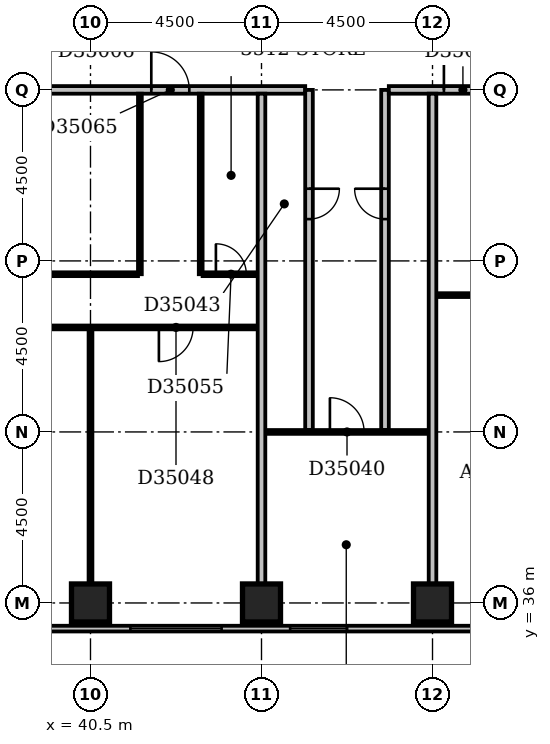
"""IFC4 building model, lengths in metres.
Left out: names, types, materials, properties, quantities, classifications, styles, units other than length and angle.
Written with IfcOpenShell. Run it as: python <this file> out.ifc"""

import sys

from ifc_helpers import new_model, si_unit, direction, frame, frame_2d, origin, origin_2d, place, context, subcontext, project, spatial, rectangle, extrude, element, fill, save


model = new_model("IFC4")
c1 = context("Model", 3, precision=1e-05, world=origin(), true_north=direction((0.0, 1.0)))
c2 = subcontext(c1, "Body", "Model", "MODEL_VIEW")
j1 = project(units=[si_unit("LENGTHUNIT", "METRE"), si_unit("PLANEANGLEUNIT", "RADIAN")], contexts=[c1])
p1 = place(None, origin())
s1 = spatial("IfcSite", under=j1, at=p1, CompositionType="ELEMENT")
p2 = place(p1, origin())
s2 = spatial("IfcBuilding", under=s1, at=p2, CompositionType="ELEMENT")
p3 = place(p2, frame((0.0, 0.0, 141.2)))
s3 = spatial("IfcBuildingStorey", under=s2, at=p3, CompositionType="ELEMENT", Elevation=141.2)
for number, where, z_axis, x_axis in (
    (1, (40.5, 36.0, -0.3), (0.0, 0.0, 1.0), (1.0, 0.0, 0.0)),
    (2, (45.0, 36.0, -0.3), (0.0, 0.0, 1.0), (1.0, 0.0, 0.0)),
    (3, (49.5, 36.0, -0.3), (0.0, 0.0, 1.0), (1.0, 0.0, 0.0)),
):
    element("IfcColumn", number, at=place(p3, frame(where, z_axis=z_axis, x_axis=x_axis)), inside=s3, PredefinedType="COLUMN", context=c2, shape_type="SweptSolid", body=[
        extrude(rectangle(XDim=1.0, YDim=1.0, at=origin_2d()), origin(), (0.0, 0.0, 1.0), 3.6),
    ])
p4 = place(p3, frame((23.1, 35.325, 0.0), z_axis=(0.0, 0.0, 1.0), x_axis=(1.0, 0.0, 0.0)))
e4 = element("IfcWall", 4, at=p4, inside=s3, PredefinedType="STANDARD", context=c2, shape_type="SweptSolid", body=[
    extrude(rectangle(XDim=45.15, YDim=0.15, at=frame_2d((22.575, 0.0))), origin(), (0.0, 0.0, 1.0), 2.7),
])
p5 = place(p4, frame((0.24, 0.0, 0.6)))
e5 = element("IfcOpeningElement", 5, at=p5, cuts=e4, PredefinedType="OPENING", context=c2, shape_type="SweptSolid", body=[
    extrude(rectangle(XDim=0.45, YDim=1.8, at=frame_2d((0.225, 0.9))), frame((0.0, 0.087, 0.0), z_axis=(0.0, -1.0, 0.0), x_axis=(1.0, 0.0, 0.0)), (0.0, 0.0, 1.0), 0.174),
])
p6 = place(p4, frame((2.529, 0.0, 0.6)))
e6 = element("IfcOpeningElement", 6, at=p6, cuts=e4, PredefinedType="OPENING", context=c2, shape_type="SweptSolid", body=[
    extrude(rectangle(XDim=0.6, YDim=1.8, at=frame_2d((0.3, 0.9))), frame((0.0, 0.087, 0.0), z_axis=(0.0, -1.0, 0.0), x_axis=(1.0, 0.0, 0.0)), (0.0, 0.0, 1.0), 0.174),
])
p7 = place(p4, frame((4.95, 0.0, 0.6)))
e7 = element("IfcOpeningElement", 7, at=p7, cuts=e4, PredefinedType="OPENING", context=c2, shape_type="SweptSolid", body=[
    extrude(rectangle(XDim=2.4, YDim=1.8, at=frame_2d((1.2, 0.9))), frame((0.0, 0.087, 0.0), z_axis=(0.0, -1.0, 0.0), x_axis=(1.0, 0.0, 0.0)), (0.0, 0.0, 1.0), 0.174),
])
p8 = place(p4, frame((9.45, 0.0, 0.6)))
e8 = element("IfcOpeningElement", 8, at=p8, cuts=e4, PredefinedType="OPENING", context=c2, shape_type="SweptSolid", body=[
    extrude(rectangle(XDim=2.4, YDim=1.8, at=frame_2d((1.2, 0.9))), frame((0.0, 0.087, 0.0), z_axis=(0.0, -1.0, 0.0), x_axis=(1.0, 0.0, 0.0)), (0.0, 0.0, 1.0), 0.174),
])
p9 = place(p4, frame((13.95, 0.0, 0.6)))
e9 = element("IfcOpeningElement", 9, at=p9, cuts=e4, PredefinedType="OPENING", context=c2, shape_type="SweptSolid", body=[
    extrude(rectangle(XDim=2.4, YDim=1.8, at=frame_2d((1.2, 0.9))), frame((0.0, 0.087, 0.0), z_axis=(0.0, -1.0, 0.0), x_axis=(1.0, 0.0, 0.0)), (0.0, 0.0, 1.0), 0.174),
])
p10 = place(p4, frame((18.45, 0.0, 0.6)))
e10 = element("IfcOpeningElement", 10, at=p10, cuts=e4, PredefinedType="OPENING", context=c2, shape_type="SweptSolid", body=[
    extrude(rectangle(XDim=2.4, YDim=1.8, at=frame_2d((1.2, 0.9))), frame((0.0, 0.087, 0.0), z_axis=(0.0, -1.0, 0.0), x_axis=(1.0, 0.0, 0.0)), (0.0, 0.0, 1.0), 0.174),
])
p11 = place(p4, frame((22.653, 0.0, 0.6)))
e11 = element("IfcOpeningElement", 11, at=p11, cuts=e4, PredefinedType="OPENING", context=c2, shape_type="SweptSolid", body=[
    extrude(rectangle(XDim=1.5, YDim=1.8, at=frame_2d((0.75, 0.9))), frame((0.0, 0.087, 0.0), z_axis=(0.0, -1.0, 0.0), x_axis=(1.0, 0.0, 0.0)), (0.0, 0.0, 1.0), 0.174),
])
p12 = place(p4, frame((29.27, 0.0, 0.6)))
e12 = element("IfcOpeningElement", 12, at=p12, cuts=e4, PredefinedType="OPENING", context=c2, shape_type="SweptSolid", body=[
    extrude(rectangle(XDim=0.9, YDim=1.8, at=frame_2d((0.45, 0.9))), frame((0.0, 0.087, 0.0), z_axis=(0.0, -1.0, 0.0), x_axis=(1.0, 0.0, 0.0)), (0.0, 0.0, 1.0), 0.174),
])
p13 = place(p4, frame((31.95, 0.0, 0.6)))
e13 = element("IfcOpeningElement", 13, at=p13, cuts=e4, PredefinedType="OPENING", context=c2, shape_type="SweptSolid", body=[
    extrude(rectangle(XDim=2.4, YDim=1.8, at=frame_2d((1.2, 0.9))), frame((0.0, 0.087, 0.0), z_axis=(0.0, -1.0, 0.0), x_axis=(1.0, 0.0, 0.0)), (0.0, 0.0, 1.0), 0.174),
])
p14 = place(p4, frame((36.45, 0.0, 0.6)))
e14 = element("IfcOpeningElement", 14, at=p14, cuts=e4, PredefinedType="OPENING", context=c2, shape_type="SweptSolid", body=[
    extrude(rectangle(XDim=2.4, YDim=1.8, at=frame_2d((1.2, 0.9))), frame((0.0, 0.087, 0.0), z_axis=(0.0, -1.0, 0.0), x_axis=(1.0, 0.0, 0.0)), (0.0, 0.0, 1.0), 0.174),
])
p15 = place(p4, frame((40.95, 0.0, 0.6)))
e15 = element("IfcOpeningElement", 15, at=p15, cuts=e4, PredefinedType="OPENING", context=c2, shape_type="SweptSolid", body=[
    extrude(rectangle(XDim=2.4, YDim=1.8, at=frame_2d((1.2, 0.9))), frame((0.0, 0.087, 0.0), z_axis=(0.0, -1.0, 0.0), x_axis=(1.0, 0.0, 0.0)), (0.0, 0.0, 1.0), 0.174),
])
p16 = place(p3, frame((40.5, 36.5, 0.0), z_axis=(0.0, 0.0, 1.0), x_axis=(0.0, 1.0, 0.0)))
e16 = element("IfcWall", 16, at=p16, inside=s3, PredefinedType="PARTITIONING", context=c2, shape_type="SweptSolid", body=[
    extrude(rectangle(XDim=6.7, YDim=0.1, at=frame_2d((3.35, 0.0))), origin(), (0.0, 0.0, 1.0), 3.3),
])
p17 = place(p3, frame((45.0, 36.5, 0.0), z_axis=(0.0, 0.0, 1.0), x_axis=(0.0, 1.0, 0.0)))
e17 = element("IfcWall", 17, at=p17, inside=s3, PredefinedType="PARTITIONING", context=c2, shape_type="SweptSolid", body=[
    extrude(rectangle(XDim=12.9, YDim=0.2, at=frame_2d((6.45, 0.0))), origin(), (0.0, 0.0, 1.0), 2.6),
])
p18 = place(p3, frame((49.5, 36.5, 0.0), z_axis=(0.0, 0.0, 1.0), x_axis=(0.0, 1.0, 0.0)))
e18 = element("IfcWall", 18, at=p18, inside=s3, PredefinedType="PARTITIONING", context=c2, shape_type="SweptSolid", body=[
    extrude(rectangle(XDim=12.9, YDim=0.2, at=frame_2d((6.45, 0.0))), origin(), (0.0, 0.0, 1.0), 3.3),
])
p19 = place(p3, frame((45.1, 40.5, 0.0), z_axis=(0.0, 0.0, 1.0), x_axis=(1.0, 0.0, 0.0)))
e19 = element("IfcWall", 19, at=p19, inside=s3, PredefinedType="PARTITIONING", context=c2, shape_type="SweptSolid", body=[
    extrude(rectangle(XDim=4.3, YDim=0.1, at=frame_2d((2.15, 0.0))), origin(), (0.0, 0.0, 1.0), 3.3),
])
p20 = place(p19, frame((1.7, 0.0, 0.0)))
e20 = element("IfcOpeningElement", 20, at=p20, cuts=e19, PredefinedType="OPENING", context=c2, shape_type="SweptSolid", body=[
    extrude(rectangle(XDim=0.9, YDim=2.1, at=frame_2d((0.45, 1.05))), frame((0.0, 0.062, 0.0), z_axis=(0.0, -1.0, 0.0), x_axis=(1.0, 0.0, 0.0)), (0.0, 0.0, 1.0), 0.124),
])
p21 = place(p3, frame((46.25, 40.55, 0.0), z_axis=(0.0, 0.0, 1.0), x_axis=(0.0, 1.0, 0.0)))
e21 = element("IfcWall", 21, at=p21, inside=s3, PredefinedType="PARTITIONING", context=c2, shape_type="SweptSolid", body=[
    extrude(rectangle(XDim=8.95, YDim=0.2, at=frame_2d((4.475, 0.0))), origin(), (0.0, 0.0, 1.0), 3.3),
])
p22 = place(p21, frame((5.55, 0.0, 0.0)))
e22 = element("IfcOpeningElement", 22, at=p22, cuts=e21, PredefinedType="OPENING", context=c2, shape_type="SweptSolid", body=[
    extrude(rectangle(XDim=0.8, YDim=2.1, at=frame_2d((0.4, 1.05))), frame((0.0, 0.112, 0.0), z_axis=(0.0, -1.0, 0.0), x_axis=(1.0, 0.0, 0.0)), (0.0, 0.0, 1.0), 0.224),
])
p23 = place(p3, frame((48.25, 40.55, 0.0), z_axis=(0.0, 0.0, 1.0), x_axis=(0.0, 1.0, 0.0)))
e23 = element("IfcWall", 23, at=p23, inside=s3, PredefinedType="PARTITIONING", context=c2, shape_type="SweptSolid", body=[
    extrude(rectangle(XDim=8.95, YDim=0.2, at=frame_2d((4.475, 0.0))), origin(), (0.0, 0.0, 1.0), 3.3),
])
p24 = place(p23, frame((5.55, 0.0, 0.0)))
e24 = element("IfcOpeningElement", 24, at=p24, cuts=e23, PredefinedType="OPENING", context=c2, shape_type="SweptSolid", body=[
    extrude(rectangle(XDim=0.8, YDim=2.1, at=frame_2d((0.4, 1.05))), frame((0.0, 0.112, 0.0), z_axis=(0.0, -1.0, 0.0), x_axis=(1.0, 0.0, 0.0)), (0.0, 0.0, 1.0), 0.224),
])
p25 = place(p3, frame((31.6, 43.25, 0.0), z_axis=(0.0, 0.0, 1.0), x_axis=(1.0, 0.0, 0.0)))
e25 = element("IfcWall", 25, at=p25, inside=s3, PredefinedType="PARTITIONING", context=c2, shape_type="SweptSolid", body=[
    extrude(rectangle(XDim=13.3, YDim=0.1, at=frame_2d((6.65, 0.0))), origin(), (0.0, 0.0, 1.0), 3.3),
])
p26 = place(p25, frame((1.7, 0.0, 0.0)))
e26 = element("IfcOpeningElement", 26, at=p26, cuts=e25, PredefinedType="OPENING", context=c2, shape_type="SweptSolid", body=[
    extrude(rectangle(XDim=0.9, YDim=2.1, at=frame_2d((0.45, 1.05))), frame((0.0, 0.062, 0.0), z_axis=(0.0, -1.0, 0.0), x_axis=(1.0, 0.0, 0.0)), (0.0, 0.0, 1.0), 0.124),
])
p27 = place(p25, frame((6.2, 0.0, 0.0)))
e27 = element("IfcOpeningElement", 27, at=p27, cuts=e25, PredefinedType="OPENING", context=c2, shape_type="SweptSolid", body=[
    extrude(rectangle(XDim=0.9, YDim=2.1, at=frame_2d((0.45, 1.05))), frame((0.0, 0.062, 0.0), z_axis=(0.0, -1.0, 0.0), x_axis=(1.0, 0.0, 0.0)), (0.0, 0.0, 1.0), 0.124),
])
p28 = place(p25, frame((10.7, 0.0, 0.0)))
e28 = element("IfcOpeningElement", 28, at=p28, cuts=e25, PredefinedType="OPENING", context=c2, shape_type="SweptSolid", body=[
    extrude(rectangle(XDim=0.9, YDim=2.1, at=frame_2d((0.45, 1.05))), frame((0.0, 0.062, 0.0), z_axis=(0.0, -1.0, 0.0), x_axis=(1.0, 0.0, 0.0)), (0.0, 0.0, 1.0), 0.124),
])
p29 = place(p3, frame((49.6, 44.1, 0.0), z_axis=(0.0, 0.0, 1.0), x_axis=(1.0, 0.0, 0.0)))
e29 = element("IfcWall", 29, at=p29, inside=s3, PredefinedType="PARTITIONING", context=c2, shape_type="SweptSolid", body=[
    extrude(rectangle(XDim=18.5, YDim=0.1, at=frame_2d((9.25, 0.0))), origin(), (0.0, 0.0, 1.0), 3.3),
])
p30 = place(p29, frame((3.95, 0.0, 0.0)))
e30 = element("IfcOpeningElement", 30, at=p30, cuts=e29, PredefinedType="OPENING", context=c2, shape_type="SweptSolid", body=[
    extrude(rectangle(XDim=0.9, YDim=2.1, at=frame_2d((0.45, 1.05))), frame((0.0, 0.062, 0.0), z_axis=(0.0, -1.0, 0.0), x_axis=(1.0, 0.0, 0.0)), (0.0, 0.0, 1.0), 0.124),
])
p31 = place(p29, frame((10.7, 0.0, 0.0)))
e31 = element("IfcOpeningElement", 31, at=p31, cuts=e29, PredefinedType="OPENING", context=c2, shape_type="SweptSolid", body=[
    extrude(rectangle(XDim=0.9, YDim=2.1, at=frame_2d((0.45, 1.05))), frame((0.0, 0.062, 0.0), z_axis=(0.0, -1.0, 0.0), x_axis=(1.0, 0.0, 0.0)), (0.0, 0.0, 1.0), 0.124),
])
p32 = place(p29, frame((14.05, 0.0, 0.0)))
e32 = element("IfcOpeningElement", 32, at=p32, cuts=e29, PredefinedType="OPENING", context=c2, shape_type="SweptSolid", body=[
    extrude(rectangle(XDim=0.9, YDim=2.1, at=frame_2d((0.45, 1.05))), frame((0.0, 0.062, 0.0), z_axis=(0.0, -1.0, 0.0), x_axis=(1.0, 0.0, 0.0)), (0.0, 0.0, 1.0), 0.124),
])
p33 = place(p3, frame((31.6, 44.65, 0.0), z_axis=(0.0, 0.0, 1.0), x_axis=(1.0, 0.0, 0.0)))
e33 = element("IfcWall", 33, at=p33, inside=s3, PredefinedType="PARTITIONING", context=c2, shape_type="SweptSolid", body=[
    extrude(rectangle(XDim=10.15, YDim=0.1, at=frame_2d((5.075, 0.0))), origin(), (0.0, 0.0, 1.0), 3.3),
])
p34 = place(p33, frame((0.7, 0.0, 0.0)))
e34 = element("IfcOpeningElement", 34, at=p34, cuts=e33, PredefinedType="OPENING", context=c2, shape_type="SweptSolid", body=[
    extrude(rectangle(XDim=0.8, YDim=2.1, at=frame_2d((0.4, 1.05))), frame((0.0, 0.062, 0.0), z_axis=(0.0, -1.0, 0.0), x_axis=(1.0, 0.0, 0.0)), (0.0, 0.0, 1.0), 0.124),
])
p35 = place(p33, frame((5.8, 0.0, 0.0)))
e35 = element("IfcOpeningElement", 35, at=p35, cuts=e33, PredefinedType="OPENING", context=c2, shape_type="SweptSolid", body=[
    extrude(rectangle(XDim=0.9, YDim=2.1, at=frame_2d((0.45, 1.05))), frame((0.0, 0.062, 0.0), z_axis=(0.0, -1.0, 0.0), x_axis=(1.0, 0.0, 0.0)), (0.0, 0.0, 1.0), 0.124),
])
for number, where, z_axis, x_axis in (
    (36, (41.8, 44.65, 0.0), (0.0, 0.0, 1.0), (0.0, 1.0, 0.0)),
    (37, (43.4, 44.65, 0.0), (0.0, 0.0, 1.0), (0.0, 1.0, 0.0)),
):
    element("IfcWall", number, at=place(p3, frame(where, z_axis=z_axis, x_axis=x_axis)), inside=s3, PredefinedType="PARTITIONING", context=c2, shape_type="SweptSolid", body=[
        extrude(rectangle(XDim=4.75, YDim=0.1, at=frame_2d((2.375, 0.0))), origin(), (0.0, 0.0, 1.0), 3.3),
    ])
p36 = place(p3, frame((43.45, 44.65, 0.0), z_axis=(0.0, 0.0, 1.0), x_axis=(1.0, 0.0, 0.0)))
e38 = element("IfcWall", 38, at=p36, inside=s3, PredefinedType="PARTITIONING", context=c2, shape_type="SweptSolid", body=[
    extrude(rectangle(XDim=1.45, YDim=0.1, at=frame_2d((0.725, 0.0))), origin(), (0.0, 0.0, 1.0), 3.3),
])
p37 = place(p36, frame((0.35, 0.0, 0.0)))
e39 = element("IfcOpeningElement", 39, at=p37, cuts=e38, PredefinedType="OPENING", context=c2, shape_type="SweptSolid", body=[
    extrude(rectangle(XDim=0.8, YDim=2.1, at=frame_2d((0.4, 1.05))), frame((0.0, 0.062, 0.0), z_axis=(0.0, -1.0, 0.0), x_axis=(1.0, 0.0, 0.0)), (0.0, 0.0, 1.0), 0.124),
])
p38 = place(p3, frame((30.35, 49.5, 0.0), z_axis=(0.0, 0.0, 1.0), x_axis=(1.0, 0.0, 0.0)))
e40 = element("IfcWall", 40, at=p38, inside=s3, PredefinedType="PARTITIONING", context=c2, shape_type="SweptSolid", body=[
    extrude(rectangle(XDim=15.8, YDim=0.2, at=frame_2d((7.9, 0.0))), origin(), (0.0, 0.0, 1.0), 3.3),
])
p39 = place(p38, frame((11.75, 0.0, 0.0)))
e41 = element("IfcOpeningElement", 41, at=p39, cuts=e40, PredefinedType="OPENING", context=c2, shape_type="SweptSolid", body=[
    extrude(rectangle(XDim=1.0, YDim=2.1, at=frame_2d((0.5, 1.05))), frame((0.0, 0.112, 0.0), z_axis=(0.0, -1.0, 0.0), x_axis=(1.0, 0.0, 0.0)), (0.0, 0.0, 1.0), 0.224),
])
p40 = place(p3, frame((48.35, 49.5, 0.0), z_axis=(0.0, 0.0, 1.0), x_axis=(1.0, 0.0, 0.0)))
e42 = element("IfcWall", 42, at=p40, inside=s3, PredefinedType="PARTITIONING", context=c2, shape_type="SweptSolid", body=[
    extrude(rectangle(XDim=18.65, YDim=0.2, at=frame_2d((9.325, 0.0))), origin(), (0.0, 0.0, 1.0), 3.3),
])
p41 = place(p40, frame((1.45, 0.0, 0.0)))
e43 = element("IfcOpeningElement", 43, at=p41, cuts=e42, PredefinedType="OPENING", context=c2, shape_type="SweptSolid", body=[
    extrude(rectangle(XDim=1.0, YDim=2.1, at=frame_2d((0.5, 1.05))), frame((0.0, 0.112, 0.0), z_axis=(0.0, -1.0, 0.0), x_axis=(1.0, 0.0, 0.0)), (0.0, 0.0, 1.0), 0.224),
])
p42 = place(p10, origin())
e44 = element("IfcWindow", 44, at=p42, inside=s3, PartitioningType="SINGLE_PANEL", PredefinedType="WINDOW", context=c2, shape_type="SweptSolid", body=[
    extrude(rectangle(XDim=2.4, YDim=1.8, at=frame_2d((1.2, 0.9))), frame((0.0, 0.03, 0.0), z_axis=(0.0, -1.0, 0.0), x_axis=(1.0, 0.0, 0.0)), (0.0, 0.0, 1.0), 0.06),
])
fill(e10, e44)
p43 = place(p11, origin())
e45 = element("IfcWindow", 45, at=p43, inside=s3, PartitioningType="SINGLE_PANEL", PredefinedType="WINDOW", context=c2, shape_type="SweptSolid", body=[
    extrude(rectangle(XDim=1.5, YDim=1.8, at=frame_2d((0.75, 0.9))), frame((0.0, 0.03, 0.0), z_axis=(0.0, -1.0, 0.0), x_axis=(1.0, 0.0, 0.0)), (0.0, 0.0, 1.0), 0.06),
])
fill(e11, e45)
p44 = place(p20, origin())
e46 = element("IfcDoor", 46, at=p44, inside=s3, OperationType="SINGLE_SWING_LEFT", PredefinedType="DOOR", context=c2, shape_type="SweptSolid", body=[
    extrude(rectangle(XDim=0.9, YDim=2.1, at=frame_2d((0.45, 1.05))), frame((0.0, 0.025, 0.0), z_axis=(0.0, -1.0, 0.0), x_axis=(1.0, 0.0, 0.0)), (0.0, 0.0, 1.0), 0.05),
])
fill(e20, e46)
p45 = place(p22, origin())
e47 = element("IfcDoor", 47, at=p45, inside=s3, OperationType="SINGLE_SWING_RIGHT", PredefinedType="DOOR", context=c2, shape_type="SweptSolid", body=[
    extrude(rectangle(XDim=0.8, YDim=2.1, at=frame_2d((0.4, 1.05))), frame((0.0, 0.025, 0.0), z_axis=(0.0, -1.0, 0.0), x_axis=(1.0, 0.0, 0.0)), (0.0, 0.0, 1.0), 0.05),
])
fill(e22, e47)
p46 = place(p24, frame((0.8, 0.0, 0.0), z_axis=(0.0, 0.0, 1.0), x_axis=(-1.0, 0.0, 0.0)))
e48 = element("IfcDoor", 48, at=p46, inside=s3, OperationType="SINGLE_SWING_LEFT", PredefinedType="DOOR", context=c2, shape_type="SweptSolid", body=[
    extrude(rectangle(XDim=0.8, YDim=2.1, at=frame_2d((0.4, 1.05))), frame((0.0, 0.025, 0.0), z_axis=(0.0, -1.0, 0.0), x_axis=(1.0, 0.0, 0.0)), (0.0, 0.0, 1.0), 0.05),
])
fill(e24, e48)
p47 = place(p28, frame((0.9, 0.0, 0.0), z_axis=(0.0, 0.0, 1.0), x_axis=(-1.0, 0.0, 0.0)))
e49 = element("IfcDoor", 49, at=p47, inside=s3, OperationType="SINGLE_SWING_RIGHT", PredefinedType="DOOR", context=c2, shape_type="SweptSolid", body=[
    extrude(rectangle(XDim=0.9, YDim=2.1, at=frame_2d((0.45, 1.05))), frame((0.0, 0.025, 0.0), z_axis=(0.0, -1.0, 0.0), x_axis=(1.0, 0.0, 0.0)), (0.0, 0.0, 1.0), 0.05),
])
fill(e28, e49)
p48 = place(p37, origin())
e50 = element("IfcDoor", 50, at=p48, inside=s3, OperationType="SINGLE_SWING_LEFT", PredefinedType="DOOR", context=c2, shape_type="SweptSolid", body=[
    extrude(rectangle(XDim=0.8, YDim=2.1, at=frame_2d((0.4, 1.05))), frame((0.0, 0.025, 0.0), z_axis=(0.0, -1.0, 0.0), x_axis=(1.0, 0.0, 0.0)), (0.0, 0.0, 1.0), 0.05),
])
fill(e39, e50)
p49 = place(p39, origin())
e51 = element("IfcDoor", 51, at=p49, inside=s3, OperationType="SINGLE_SWING_LEFT", PredefinedType="DOOR", context=c2, shape_type="SweptSolid", body=[
    extrude(rectangle(XDim=1.0, YDim=2.1, at=frame_2d((0.5, 1.05))), frame((0.0, 0.025, 0.0), z_axis=(0.0, -1.0, 0.0), x_axis=(1.0, 0.0, 0.0)), (0.0, 0.0, 1.0), 0.05),
])
fill(e41, e51)
p50 = place(p41, origin())
e52 = element("IfcDoor", 52, at=p50, inside=s3, OperationType="SINGLE_SWING_LEFT", PredefinedType="DOOR", context=c2, shape_type="SweptSolid", body=[
    extrude(rectangle(XDim=1.0, YDim=2.1, at=frame_2d((0.5, 1.05))), frame((0.0, 0.025, 0.0), z_axis=(0.0, -1.0, 0.0), x_axis=(1.0, 0.0, 0.0)), (0.0, 0.0, 1.0), 0.05),
])
fill(e43, e52)
save(model, sys.argv[1])
